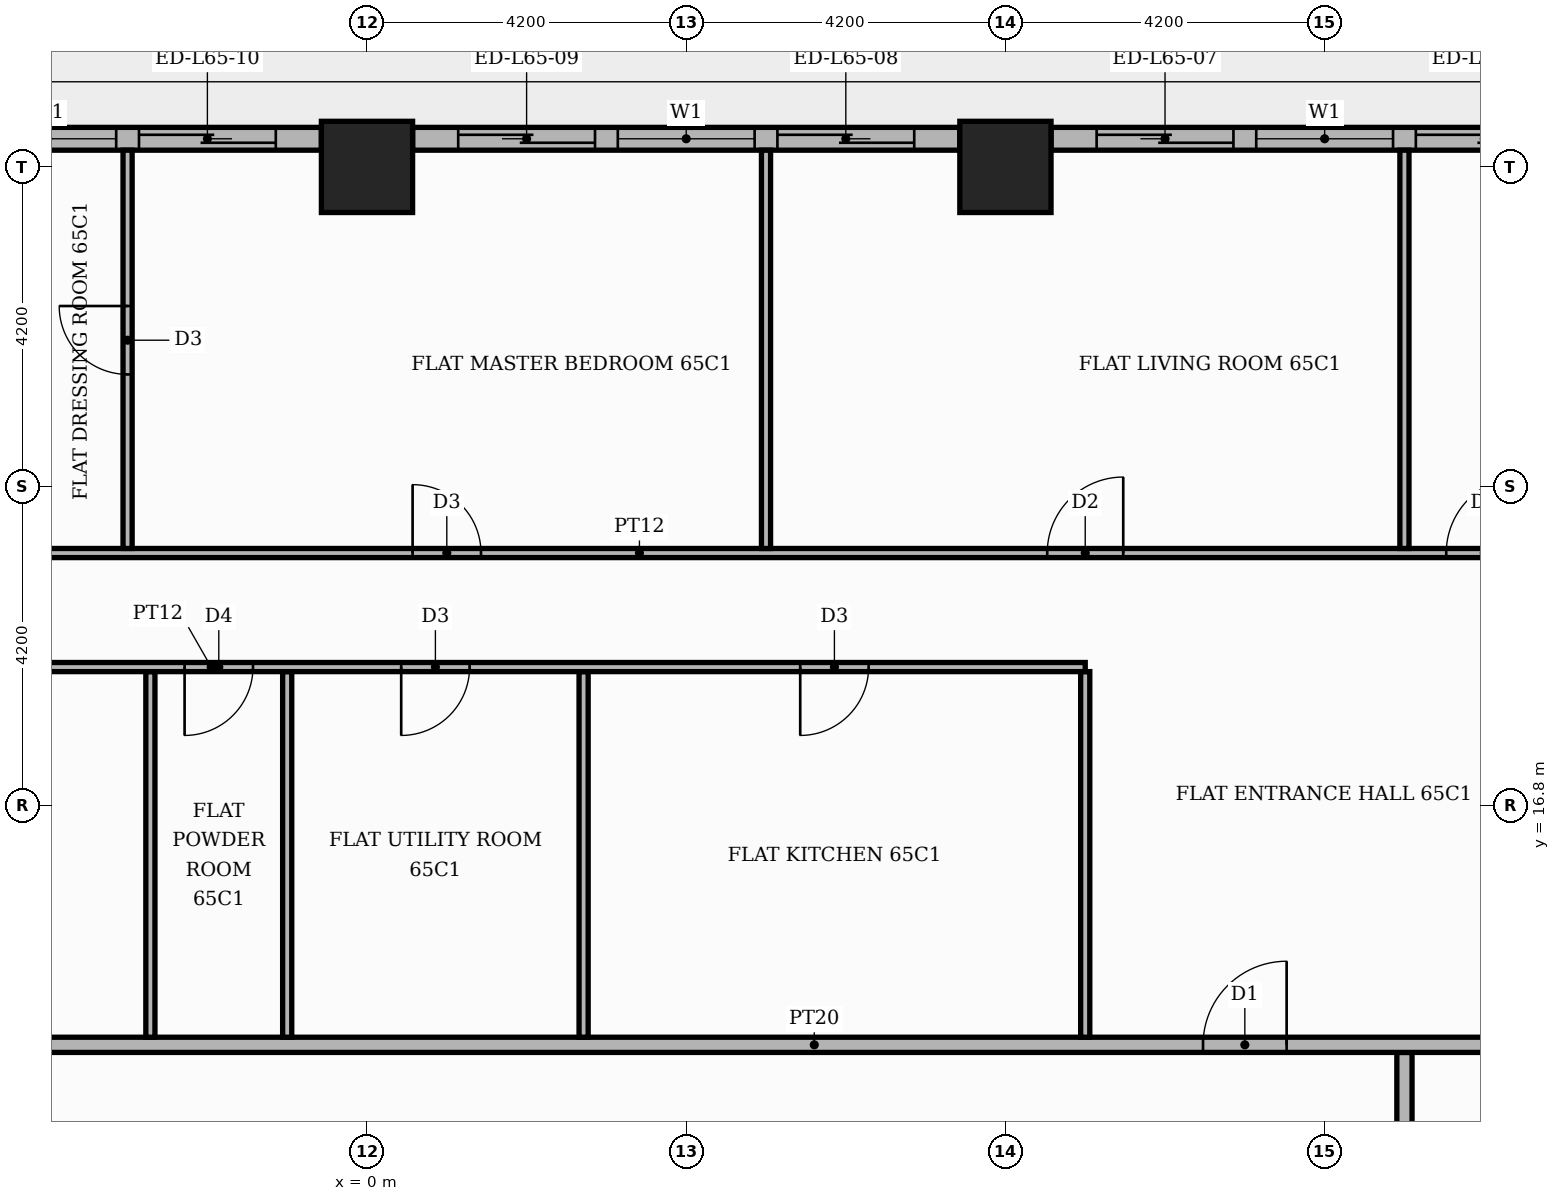
"""IFC4 building model, lengths in metres.
Left out: names, types, materials, properties, quantities, classifications, styles, units other than length and angle.
Written with IfcOpenShell. Run it as: python <this file> out.ifc"""

import sys

from ifc_helpers import new_model, si_unit, direction, frame, frame_2d, origin, origin_2d, place, context, subcontext, project, spatial, rectangle, extrude, element, fill, save


model = new_model("IFC4")
c1 = context("Model", 3, precision=1e-05, world=origin(), true_north=direction((0.0, 1.0)))
c2 = subcontext(c1, "Body", "Model", "MODEL_VIEW")
j1 = project(units=[si_unit("LENGTHUNIT", "METRE"), si_unit("PLANEANGLEUNIT", "RADIAN")], contexts=[c1])
p1 = place(None, origin())
s1 = spatial("IfcSite", under=j1, at=p1, CompositionType="ELEMENT")
p2 = place(p1, origin())
s2 = spatial("IfcBuilding", under=s1, at=p2, CompositionType="ELEMENT")
p3 = place(p2, frame((0.0, 0.0, 271.8)))
s3 = spatial("IfcBuildingStorey", under=s2, at=p3, CompositionType="ELEMENT", Elevation=271.8)
for number, where, z_axis, x_axis in (
    (1, (0.0, 25.2, 0.0), (0.0, 0.0, 1.0), (1.0, 0.0, 0.0)),
    (2, (8.4, 25.2, 0.0), (0.0, 0.0, 1.0), (1.0, 0.0, 0.0)),
):
    element("IfcColumn", number, at=place(p3, frame(where, z_axis=z_axis, x_axis=x_axis)), inside=s3, PredefinedType="COLUMN", context=c2, shape_type="SweptSolid", body=[
        extrude(rectangle(XDim=1.2, YDim=1.2, at=origin_2d()), origin(), (0.0, 0.0, 1.0), 3.9),
    ])
p4 = place(p3, frame((16.2, 25.57, 0.0), z_axis=(0.0, 0.0, 1.0), x_axis=(-1.0, 0.0, 0.0)))
e3 = element("IfcWall", 3, at=p4, inside=s3, PredefinedType="STANDARD", context=c2, shape_type="SweptSolid", body=[
    extrude(rectangle(XDim=7.2, YDim=0.3, at=frame_2d((3.6, 0.0))), origin(), (0.0, 0.0, 1.0), 3.48),
])
p5 = place(p4, frame((0.6, 0.0, 0.0)))
e4 = element("IfcOpeningElement", 4, at=p5, cuts=e3, PredefinedType="OPENING", context=c2, shape_type="SweptSolid", body=[
    extrude(rectangle(XDim=1.8, YDim=2.4, at=frame_2d((0.9, 1.2))), frame((0.0, 0.16, 0.0), z_axis=(0.0, -1.0, 0.0), x_axis=(1.0, 0.0, 0.0)), (0.0, 0.0, 1.0), 0.32),
])
p6 = place(p4, frame((2.7, 0.0, 0.9)))
e5 = element("IfcOpeningElement", 5, at=p6, cuts=e3, PredefinedType="OPENING", context=c2, shape_type="SweptSolid", body=[
    extrude(rectangle(XDim=1.8, YDim=2.1, at=frame_2d((0.9, 1.05))), frame((0.0, 0.16, 0.0), z_axis=(0.0, -1.0, 0.0), x_axis=(1.0, 0.0, 0.0)), (0.0, 0.0, 1.0), 0.32),
])
p7 = place(p4, frame((4.8, 0.0, 0.0)))
e6 = element("IfcOpeningElement", 6, at=p7, cuts=e3, PredefinedType="OPENING", context=c2, shape_type="SweptSolid", body=[
    extrude(rectangle(XDim=1.8, YDim=2.4, at=frame_2d((0.9, 1.2))), frame((0.0, 0.16, 0.0), z_axis=(0.0, -1.0, 0.0), x_axis=(1.0, 0.0, 0.0)), (0.0, 0.0, 1.0), 0.32),
])
p8 = place(p3, frame((7.8, 25.57, 0.0), z_axis=(0.0, 0.0, 1.0), x_axis=(-1.0, 0.0, 0.0)))
e7 = element("IfcWall", 7, at=p8, inside=s3, PredefinedType="STANDARD", context=c2, shape_type="SweptSolid", body=[
    extrude(rectangle(XDim=7.2, YDim=0.3, at=frame_2d((3.6, 0.0))), origin(), (0.0, 0.0, 1.0), 3.48),
])
p9 = place(p8, frame((0.6, 0.0, 0.0)))
e8 = element("IfcOpeningElement", 8, at=p9, cuts=e7, PredefinedType="OPENING", context=c2, shape_type="SweptSolid", body=[
    extrude(rectangle(XDim=1.8, YDim=2.4, at=frame_2d((0.9, 1.2))), frame((0.0, 0.16, 0.0), z_axis=(0.0, -1.0, 0.0), x_axis=(1.0, 0.0, 0.0)), (0.0, 0.0, 1.0), 0.32),
])
p10 = place(p8, frame((2.7, 0.0, 0.9)))
e9 = element("IfcOpeningElement", 9, at=p10, cuts=e7, PredefinedType="OPENING", context=c2, shape_type="SweptSolid", body=[
    extrude(rectangle(XDim=1.8, YDim=2.1, at=frame_2d((0.9, 1.05))), frame((0.0, 0.16, 0.0), z_axis=(0.0, -1.0, 0.0), x_axis=(1.0, 0.0, 0.0)), (0.0, 0.0, 1.0), 0.32),
])
p11 = place(p8, frame((4.8, 0.0, 0.0)))
e10 = element("IfcOpeningElement", 10, at=p11, cuts=e7, PredefinedType="OPENING", context=c2, shape_type="SweptSolid", body=[
    extrude(rectangle(XDim=1.8, YDim=2.4, at=frame_2d((0.9, 1.2))), frame((0.0, 0.16, 0.0), z_axis=(0.0, -1.0, 0.0), x_axis=(1.0, 0.0, 0.0)), (0.0, 0.0, 1.0), 0.32),
])
p12 = place(p3, frame((-0.6, 25.57, 0.0), z_axis=(0.0, 0.0, 1.0), x_axis=(-1.0, 0.0, 0.0)))
e11 = element("IfcWall", 11, at=p12, inside=s3, PredefinedType="STANDARD", context=c2, shape_type="SweptSolid", body=[
    extrude(rectangle(XDim=7.2, YDim=0.3, at=frame_2d((3.6, 0.0))), origin(), (0.0, 0.0, 1.0), 3.48),
])
p13 = place(p12, frame((0.6, 0.0, 0.0)))
e12 = element("IfcOpeningElement", 12, at=p13, cuts=e11, PredefinedType="OPENING", context=c2, shape_type="SweptSolid", body=[
    extrude(rectangle(XDim=1.8, YDim=2.4, at=frame_2d((0.9, 1.2))), frame((0.0, 0.16, 0.0), z_axis=(0.0, -1.0, 0.0), x_axis=(1.0, 0.0, 0.0)), (0.0, 0.0, 1.0), 0.32),
])
p14 = place(p12, frame((2.7, 0.0, 0.9)))
e13 = element("IfcOpeningElement", 13, at=p14, cuts=e11, PredefinedType="OPENING", context=c2, shape_type="SweptSolid", body=[
    extrude(rectangle(XDim=1.8, YDim=2.1, at=frame_2d((0.9, 1.05))), frame((0.0, 0.16, 0.0), z_axis=(0.0, -1.0, 0.0), x_axis=(1.0, 0.0, 0.0)), (0.0, 0.0, 1.0), 0.32),
])
p15 = place(p12, frame((4.8, 0.0, 0.9)))
e14 = element("IfcOpeningElement", 14, at=p15, cuts=e11, PredefinedType="OPENING", context=c2, shape_type="SweptSolid", body=[
    extrude(rectangle(XDim=1.8, YDim=2.1, at=frame_2d((0.9, 1.05))), frame((0.0, 0.16, 0.0), z_axis=(0.0, -1.0, 0.0), x_axis=(1.0, 0.0, 0.0)), (0.0, 0.0, 1.0), 0.32),
])
p16 = place(p3, frame((13.65, 11.1, 0.0), z_axis=(0.0, 0.0, 1.0), x_axis=(0.0, 1.0, 0.0)))
e15 = element("IfcWall", 15, at=p16, inside=s3, PredefinedType="PARTITIONING", context=c2, shape_type="SweptSolid", body=[
    extrude(rectangle(XDim=2.45, YDim=0.2, at=frame_2d((1.225, 0.0))), origin(), (0.0, 0.0, 1.0), 3.48),
])
p17 = place(p3, frame((-13.65, 13.65, 0.0), z_axis=(0.0, 0.0, 1.0), x_axis=(1.0, 0.0, 0.0)))
e16 = element("IfcWall", 16, at=p17, inside=s3, PredefinedType="PARTITIONING", context=c2, shape_type="SweptSolid", body=[
    extrude(rectangle(XDim=39.07, YDim=0.2, at=frame_2d((19.535, 0.0))), origin(), (0.0, 0.0, 1.0), 3.48),
])
p18 = place(p17, frame((24.65, 0.0, 0.0)))
e17 = element("IfcOpeningElement", 17, at=p18, cuts=e16, PredefinedType="OPENING", context=c2, shape_type="SweptSolid", body=[
    extrude(rectangle(XDim=1.1, YDim=2.4, at=frame_2d((0.55, 1.2))), frame((0.0, 0.11, 0.0), z_axis=(0.0, -1.0, 0.0), x_axis=(1.0, 0.0, 0.0)), (0.0, 0.0, 1.0), 0.22),
])
for number, where, z_axis, x_axis in (
    (18, (-2.85, 13.75, 0.0), (0.0, 0.0, 1.0), (0.0, 1.0, 0.0)),
    (19, (-1.05, 13.75, 0.0), (0.0, 0.0, 1.0), (0.0, 1.0, 0.0)),
    (20, (2.85, 13.75, 0.0), (0.0, 0.0, 1.0), (0.0, 1.0, 0.0)),
    (21, (9.45, 13.75, 0.0), (0.0, 0.0, 1.0), (0.0, 1.0, 0.0)),
):
    element("IfcWall", number, at=place(p3, frame(where, z_axis=z_axis, x_axis=x_axis)), inside=s3, PredefinedType="PARTITIONING", context=c2, shape_type="SweptSolid", body=[
        extrude(rectangle(XDim=4.81, YDim=0.12, at=frame_2d((2.405, 0.0))), origin(), (0.0, 0.0, 1.0), 3.48),
    ])
p19 = place(p3, frame((-13.55, 18.62, 0.0), z_axis=(0.0, 0.0, 1.0), x_axis=(1.0, 0.0, 0.0)))
e22 = element("IfcWall", 22, at=p19, inside=s3, PredefinedType="PARTITIONING", context=c2, shape_type="SweptSolid", body=[
    extrude(rectangle(XDim=23.0, YDim=0.12, at=frame_2d((11.5, 0.0))), origin(), (0.0, 0.0, 1.0), 3.48),
])
p20 = place(p19, frame((19.25, 0.0, 0.0)))
e23 = element("IfcOpeningElement", 23, at=p20, cuts=e22, PredefinedType="OPENING", context=c2, shape_type="SweptSolid", body=[
    extrude(rectangle(XDim=0.9, YDim=2.1, at=frame_2d((0.45, 1.05))), frame((0.0, 0.07, 0.0), z_axis=(0.0, -1.0, 0.0), x_axis=(1.0, 0.0, 0.0)), (0.0, 0.0, 1.0), 0.14),
])
p21 = place(p19, frame((14.0, 0.0, 0.0)))
e24 = element("IfcOpeningElement", 24, at=p21, cuts=e22, PredefinedType="OPENING", context=c2, shape_type="SweptSolid", body=[
    extrude(rectangle(XDim=0.9, YDim=2.1, at=frame_2d((0.45, 1.05))), frame((0.0, 0.07, 0.0), z_axis=(0.0, -1.0, 0.0), x_axis=(1.0, 0.0, 0.0)), (0.0, 0.0, 1.0), 0.14),
])
p22 = place(p19, frame((11.15, 0.0, 0.0)))
e25 = element("IfcOpeningElement", 25, at=p22, cuts=e22, PredefinedType="OPENING", context=c2, shape_type="SweptSolid", body=[
    extrude(rectangle(XDim=0.9, YDim=2.1, at=frame_2d((0.45, 1.05))), frame((0.0, 0.07, 0.0), z_axis=(0.0, -1.0, 0.0), x_axis=(1.0, 0.0, 0.0)), (0.0, 0.0, 1.0), 0.14),
])
p23 = place(p19, frame((6.95, 0.0, 0.0)))
e26 = element("IfcOpeningElement", 26, at=p23, cuts=e22, PredefinedType="OPENING", context=c2, shape_type="SweptSolid", body=[
    extrude(rectangle(XDim=0.9, YDim=2.1, at=frame_2d((0.45, 1.05))), frame((0.0, 0.07, 0.0), z_axis=(0.0, -1.0, 0.0), x_axis=(1.0, 0.0, 0.0)), (0.0, 0.0, 1.0), 0.14),
])
p24 = place(p19, frame((2.6, 0.0, 0.0)))
e27 = element("IfcOpeningElement", 27, at=p24, cuts=e22, PredefinedType="OPENING", context=c2, shape_type="SweptSolid", body=[
    extrude(rectangle(XDim=0.9, YDim=2.1, at=frame_2d((0.45, 1.05))), frame((0.0, 0.07, 0.0), z_axis=(0.0, -1.0, 0.0), x_axis=(1.0, 0.0, 0.0)), (0.0, 0.0, 1.0), 0.14),
])
p25 = place(p19, frame((0.5, 0.0, 0.0)))
e28 = element("IfcOpeningElement", 28, at=p25, cuts=e22, PredefinedType="OPENING", context=c2, shape_type="SweptSolid", body=[
    extrude(rectangle(XDim=0.9, YDim=2.1, at=frame_2d((0.45, 1.05))), frame((0.0, 0.07, 0.0), z_axis=(0.0, -1.0, 0.0), x_axis=(1.0, 0.0, 0.0)), (0.0, 0.0, 1.0), 0.14),
])
p26 = place(p3, frame((-13.55, 20.12, 0.0), z_axis=(0.0, 0.0, 1.0), x_axis=(1.0, 0.0, 0.0)))
e29 = element("IfcWall", 29, at=p26, inside=s3, PredefinedType="PARTITIONING", context=c2, shape_type="SweptSolid", body=[
    extrude(rectangle(XDim=34.269, YDim=0.12, at=frame_2d((17.135, 0.0))), origin(), (0.0, 0.0, 1.0), 3.48),
])
p27 = place(p26, frame((27.75, 0.0, 0.0)))
e30 = element("IfcOpeningElement", 30, at=p27, cuts=e29, PredefinedType="OPENING", context=c2, shape_type="SweptSolid", body=[
    extrude(rectangle(XDim=1.0, YDim=2.1, at=frame_2d((0.5, 1.05))), frame((0.0, 0.07, 0.0), z_axis=(0.0, -1.0, 0.0), x_axis=(1.0, 0.0, 0.0)), (0.0, 0.0, 1.0), 0.14),
])
p28 = place(p26, frame((22.5, 0.0, 0.0)))
e31 = element("IfcOpeningElement", 31, at=p28, cuts=e29, PredefinedType="OPENING", context=c2, shape_type="SweptSolid", body=[
    extrude(rectangle(XDim=1.0, YDim=2.1, at=frame_2d((0.5, 1.05))), frame((0.0, 0.07, 0.0), z_axis=(0.0, -1.0, 0.0), x_axis=(1.0, 0.0, 0.0)), (0.0, 0.0, 1.0), 0.14),
])
p29 = place(p26, frame((14.15, 0.0, 0.0)))
e32 = element("IfcOpeningElement", 32, at=p29, cuts=e29, PredefinedType="OPENING", context=c2, shape_type="SweptSolid", body=[
    extrude(rectangle(XDim=0.9, YDim=2.1, at=frame_2d((0.45, 1.05))), frame((0.0, 0.07, 0.0), z_axis=(0.0, -1.0, 0.0), x_axis=(1.0, 0.0, 0.0)), (0.0, 0.0, 1.0), 0.14),
])
p30 = place(p26, frame((3.65, 0.0, 0.0)))
e33 = element("IfcOpeningElement", 33, at=p30, cuts=e29, PredefinedType="OPENING", context=c2, shape_type="SweptSolid", body=[
    extrude(rectangle(XDim=0.9, YDim=2.1, at=frame_2d((0.45, 1.05))), frame((0.0, 0.07, 0.0), z_axis=(0.0, -1.0, 0.0), x_axis=(1.0, 0.0, 0.0)), (0.0, 0.0, 1.0), 0.14),
])
p31 = place(p3, frame((-3.15, 20.18, 0.0), z_axis=(0.0, 0.0, 1.0), x_axis=(0.0, 1.0, 0.0)))
e34 = element("IfcWall", 34, at=p31, inside=s3, PredefinedType="PARTITIONING", context=c2, shape_type="SweptSolid", body=[
    extrude(rectangle(XDim=5.24, YDim=0.12, at=frame_2d((2.62, 0.0))), origin(), (0.0, 0.0, 1.0), 3.48),
])
p32 = place(p31, frame((2.29, 0.0, 0.0)))
e35 = element("IfcOpeningElement", 35, at=p32, cuts=e34, PredefinedType="OPENING", context=c2, shape_type="SweptSolid", body=[
    extrude(rectangle(XDim=0.9, YDim=2.1, at=frame_2d((0.45, 1.05))), frame((0.0, 0.07, 0.0), z_axis=(0.0, -1.0, 0.0), x_axis=(1.0, 0.0, 0.0)), (0.0, 0.0, 1.0), 0.14),
])
for number, where, z_axis, x_axis in (
    (36, (5.25, 20.18, 0.0), (0.0, 0.0, 1.0), (0.0, 1.0, 0.0)),
    (37, (13.65, 20.18, 0.0), (0.0, 0.0, 1.0), (0.0, 1.0, 0.0)),
):
    element("IfcWall", number, at=place(p3, frame(where, z_axis=z_axis, x_axis=x_axis)), inside=s3, PredefinedType="PARTITIONING", context=c2, shape_type="SweptSolid", body=[
        extrude(rectangle(XDim=5.24, YDim=0.12, at=frame_2d((2.62, 0.0))), origin(), (0.0, 0.0, 1.0), 3.48),
    ])
p33 = place(p5, origin())
e38 = element("IfcDoor", 38, at=p33, inside=s3, OperationType="SLIDING_TO_LEFT", PredefinedType="DOOR", context=c2, shape_type="SweptSolid", body=[
    extrude(rectangle(XDim=1.8, YDim=2.4, at=frame_2d((0.9, 1.2))), frame((0.0, 0.025, 0.0), z_axis=(0.0, -1.0, 0.0), x_axis=(1.0, 0.0, 0.0)), (0.0, 0.0, 1.0), 0.05),
])
fill(e4, e38)
p34 = place(p6, origin())
e39 = element("IfcWindow", 39, at=p34, inside=s3, PartitioningType="SINGLE_PANEL", PredefinedType="WINDOW", context=c2, shape_type="SweptSolid", body=[
    extrude(rectangle(XDim=1.8, YDim=2.1, at=frame_2d((0.9, 1.05))), frame((0.0, 0.03, 0.0), z_axis=(0.0, -1.0, 0.0), x_axis=(1.0, 0.0, 0.0)), (0.0, 0.0, 1.0), 0.06),
])
fill(e5, e39)
p35 = place(p7, origin())
e40 = element("IfcDoor", 40, at=p35, inside=s3, OperationType="SLIDING_TO_RIGHT", PredefinedType="DOOR", context=c2, shape_type="SweptSolid", body=[
    extrude(rectangle(XDim=1.8, YDim=2.4, at=frame_2d((0.9, 1.2))), frame((0.0, 0.025, 0.0), z_axis=(0.0, -1.0, 0.0), x_axis=(1.0, 0.0, 0.0)), (0.0, 0.0, 1.0), 0.05),
])
fill(e6, e40)
p36 = place(p9, origin())
e41 = element("IfcDoor", 41, at=p36, inside=s3, OperationType="SLIDING_TO_LEFT", PredefinedType="DOOR", context=c2, shape_type="SweptSolid", body=[
    extrude(rectangle(XDim=1.8, YDim=2.4, at=frame_2d((0.9, 1.2))), frame((0.0, 0.025, 0.0), z_axis=(0.0, -1.0, 0.0), x_axis=(1.0, 0.0, 0.0)), (0.0, 0.0, 1.0), 0.05),
])
fill(e8, e41)
p37 = place(p10, origin())
e42 = element("IfcWindow", 42, at=p37, inside=s3, PartitioningType="SINGLE_PANEL", PredefinedType="WINDOW", context=c2, shape_type="SweptSolid", body=[
    extrude(rectangle(XDim=1.8, YDim=2.1, at=frame_2d((0.9, 1.05))), frame((0.0, 0.03, 0.0), z_axis=(0.0, -1.0, 0.0), x_axis=(1.0, 0.0, 0.0)), (0.0, 0.0, 1.0), 0.06),
])
fill(e9, e42)
p38 = place(p11, origin())
e43 = element("IfcDoor", 43, at=p38, inside=s3, OperationType="SLIDING_TO_RIGHT", PredefinedType="DOOR", context=c2, shape_type="SweptSolid", body=[
    extrude(rectangle(XDim=1.8, YDim=2.4, at=frame_2d((0.9, 1.2))), frame((0.0, 0.025, 0.0), z_axis=(0.0, -1.0, 0.0), x_axis=(1.0, 0.0, 0.0)), (0.0, 0.0, 1.0), 0.05),
])
fill(e10, e43)
p39 = place(p13, origin())
e44 = element("IfcDoor", 44, at=p39, inside=s3, OperationType="SLIDING_TO_LEFT", PredefinedType="DOOR", context=c2, shape_type="SweptSolid", body=[
    extrude(rectangle(XDim=1.8, YDim=2.4, at=frame_2d((0.9, 1.2))), frame((0.0, 0.025, 0.0), z_axis=(0.0, -1.0, 0.0), x_axis=(1.0, 0.0, 0.0)), (0.0, 0.0, 1.0), 0.05),
])
fill(e12, e44)
p40 = place(p14, origin())
e45 = element("IfcWindow", 45, at=p40, inside=s3, PartitioningType="SINGLE_PANEL", PredefinedType="WINDOW", context=c2, shape_type="SweptSolid", body=[
    extrude(rectangle(XDim=1.8, YDim=2.1, at=frame_2d((0.9, 1.05))), frame((0.0, 0.03, 0.0), z_axis=(0.0, -1.0, 0.0), x_axis=(1.0, 0.0, 0.0)), (0.0, 0.0, 1.0), 0.06),
])
fill(e13, e45)
p41 = place(p18, origin())
e46 = element("IfcDoor", 46, at=p41, inside=s3, OperationType="SINGLE_SWING_RIGHT", PredefinedType="DOOR", context=c2, shape_type="SweptSolid", body=[
    extrude(rectangle(XDim=1.1, YDim=2.4, at=frame_2d((0.55, 1.2))), frame((0.0, 0.025, 0.0), z_axis=(0.0, -1.0, 0.0), x_axis=(1.0, 0.0, 0.0)), (0.0, 0.0, 1.0), 0.05),
])
fill(e17, e46)
p42 = place(p20, frame((0.9, 0.0, 0.0), z_axis=(0.0, 0.0, 1.0), x_axis=(-1.0, 0.0, 0.0)))
e47 = element("IfcDoor", 47, at=p42, inside=s3, OperationType="SINGLE_SWING_LEFT", PredefinedType="DOOR", context=c2, shape_type="SweptSolid", body=[
    extrude(rectangle(XDim=0.9, YDim=2.1, at=frame_2d((0.45, 1.05))), frame((0.0, 0.025, 0.0), z_axis=(0.0, -1.0, 0.0), x_axis=(1.0, 0.0, 0.0)), (0.0, 0.0, 1.0), 0.05),
])
fill(e23, e47)
p43 = place(p21, frame((0.9, 0.0, 0.0), z_axis=(0.0, 0.0, 1.0), x_axis=(-1.0, 0.0, 0.0)))
e48 = element("IfcDoor", 48, at=p43, inside=s3, OperationType="SINGLE_SWING_LEFT", PredefinedType="DOOR", context=c2, shape_type="SweptSolid", body=[
    extrude(rectangle(XDim=0.9, YDim=2.1, at=frame_2d((0.45, 1.05))), frame((0.0, 0.025, 0.0), z_axis=(0.0, -1.0, 0.0), x_axis=(1.0, 0.0, 0.0)), (0.0, 0.0, 1.0), 0.05),
])
fill(e24, e48)
p44 = place(p22, frame((0.9, 0.0, 0.0), z_axis=(0.0, 0.0, 1.0), x_axis=(-1.0, 0.0, 0.0)))
e49 = element("IfcDoor", 49, at=p44, inside=s3, OperationType="SINGLE_SWING_LEFT", PredefinedType="DOOR", context=c2, shape_type="SweptSolid", body=[
    extrude(rectangle(XDim=0.9, YDim=2.1, at=frame_2d((0.45, 1.05))), frame((0.0, 0.025, 0.0), z_axis=(0.0, -1.0, 0.0), x_axis=(1.0, 0.0, 0.0)), (0.0, 0.0, 1.0), 0.05),
])
fill(e25, e49)
p45 = place(p27, origin())
e50 = element("IfcDoor", 50, at=p45, inside=s3, OperationType="SINGLE_SWING_RIGHT", PredefinedType="DOOR", context=c2, shape_type="SweptSolid", body=[
    extrude(rectangle(XDim=1.0, YDim=2.1, at=frame_2d((0.5, 1.05))), frame((0.0, 0.025, 0.0), z_axis=(0.0, -1.0, 0.0), x_axis=(1.0, 0.0, 0.0)), (0.0, 0.0, 1.0), 0.05),
])
fill(e30, e50)
p46 = place(p28, origin())
e51 = element("IfcDoor", 51, at=p46, inside=s3, OperationType="SINGLE_SWING_RIGHT", PredefinedType="DOOR", context=c2, shape_type="SweptSolid", body=[
    extrude(rectangle(XDim=1.0, YDim=2.1, at=frame_2d((0.5, 1.05))), frame((0.0, 0.025, 0.0), z_axis=(0.0, -1.0, 0.0), x_axis=(1.0, 0.0, 0.0)), (0.0, 0.0, 1.0), 0.05),
])
fill(e31, e51)
p47 = place(p29, origin())
e52 = element("IfcDoor", 52, at=p47, inside=s3, OperationType="SINGLE_SWING_LEFT", PredefinedType="DOOR", context=c2, shape_type="SweptSolid", body=[
    extrude(rectangle(XDim=0.9, YDim=2.1, at=frame_2d((0.45, 1.05))), frame((0.0, 0.025, 0.0), z_axis=(0.0, -1.0, 0.0), x_axis=(1.0, 0.0, 0.0)), (0.0, 0.0, 1.0), 0.05),
])
fill(e32, e52)
p48 = place(p32, origin())
e53 = element("IfcDoor", 53, at=p48, inside=s3, OperationType="SINGLE_SWING_RIGHT", PredefinedType="DOOR", context=c2, shape_type="SweptSolid", body=[
    extrude(rectangle(XDim=0.9, YDim=2.1, at=frame_2d((0.45, 1.05))), frame((0.0, 0.025, 0.0), z_axis=(0.0, -1.0, 0.0), x_axis=(1.0, 0.0, 0.0)), (0.0, 0.0, 1.0), 0.05),
])
fill(e35, e53)
save(model, sys.argv[1])
